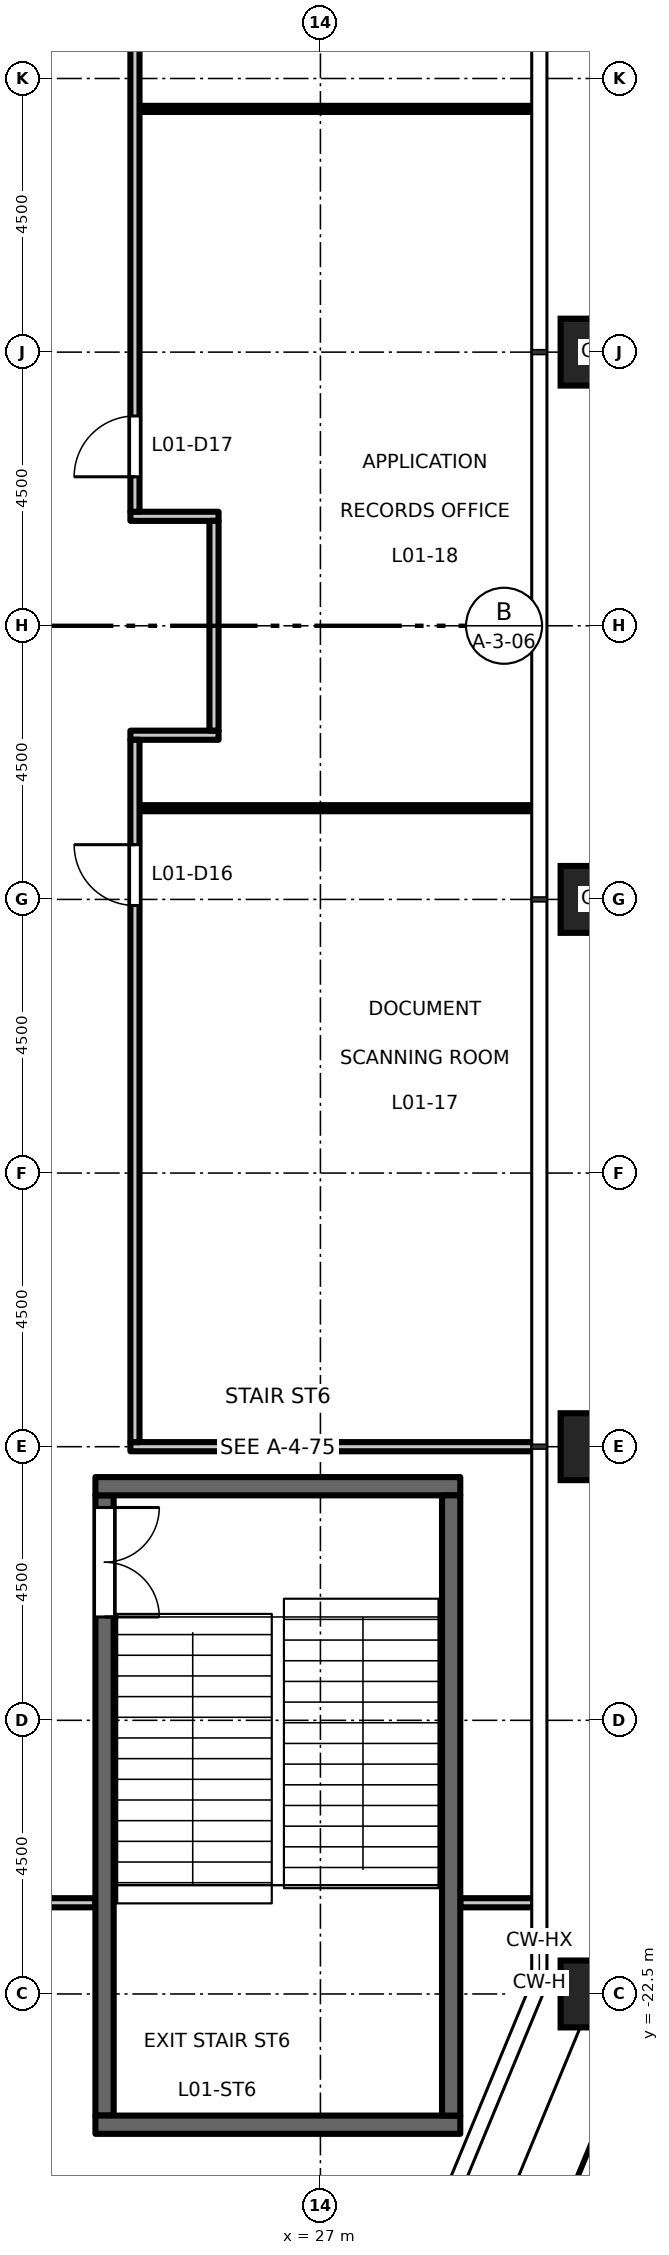
"""IFC4 building model, lengths in metres.
Left out: names, types, materials, properties, quantities, classifications, styles, units other than length and angle.
Written with IfcOpenShell. Run it as: python <this file> out.ifc"""

import sys

from ifc_helpers import new_model, si_unit, direction, frame, frame_2d, origin, origin_2d, place, context, subcontext, project, spatial, rectangle, hollow_rectangle, extrude, element, fill, save


model = new_model("IFC4")
c1 = context("Model", 3, precision=1e-05, world=origin(), true_north=direction((0.0, 1.0)))
c2 = subcontext(c1, "Body", "Model", "MODEL_VIEW")
j1 = project(units=[si_unit("LENGTHUNIT", "METRE"), si_unit("PLANEANGLEUNIT", "RADIAN")], contexts=[c1])
p1 = place(None, origin())
s1 = spatial("IfcSite", under=j1, at=p1, CompositionType="ELEMENT")
p2 = place(p1, origin())
s2 = spatial("IfcBuilding", under=s1, at=p2, CompositionType="ELEMENT")
p3 = place(p2, frame((0.0, 0.0, 7.2)))
s3 = spatial("IfcBuildingStorey", under=s2, at=p3, CompositionType="ELEMENT", Elevation=7.2)
for number, where, z_axis, x_axis in (
    (1, (31.5, -22.5, 0.0), (0.0, 0.0, 1.0), (1.0, 0.0, 0.0)),
    (2, (31.5, -13.5, 0.0), (0.0, 0.0, 1.0), (1.0, 0.0, 0.0)),
    (3, (31.5, -4.5, 0.0), (0.0, 0.0, 1.0), (1.0, 0.0, 0.0)),
    (4, (31.5, 4.5, 0.0), (0.0, 0.0, 1.0), (1.0, 0.0, 0.0)),
):
    element("IfcColumn", number, at=place(p3, frame(where, z_axis=z_axis, x_axis=x_axis)), inside=s3, PredefinedType="COLUMN", context=c2, shape_type="SweptSolid", body=[
        extrude(hollow_rectangle(XDim=1.1, YDim=1.1, WallThickness=0.07, at=origin_2d()), origin(), (0.0, 0.0, 1.0), 5.0),
    ])
p4 = place(p3, frame((23.45, -14.3, 0.0), z_axis=(0.0, 0.0, 1.0), x_axis=(0.0, -1.0, 0.0)))
e5 = element("IfcWall", 5, at=p4, inside=s3, PredefinedType="SHEAR", context=c2, shape_type="SweptSolid", body=[
    extrude(rectangle(XDim=10.2, YDim=0.3, at=frame_2d((5.1, 0.0))), origin(), (0.0, 0.0, 1.0), 4.8),
])
p5 = place(p4, frame((0.2, 0.0, 0.0)))
e6 = element("IfcOpeningElement", 6, at=p5, cuts=e5, PredefinedType="OPENING", context=c2, shape_type="SweptSolid", body=[
    extrude(rectangle(XDim=1.8, YDim=2.1, at=frame_2d((0.9, 1.05))), frame((0.0, 0.16, 0.0), z_axis=(0.0, -1.0, 0.0), x_axis=(1.0, 0.0, 0.0)), (0.0, 0.0, 1.0), 0.32),
])
for number, where, z_axis, x_axis in (
    (7, (29.3, -24.65, 0.0), (0.0, 0.0, 1.0), (-1.0, 0.0, 0.0)),
    (8, (29.3, -14.15, 0.0), (0.0, 0.0, 1.0), (-1.0, 0.0, 0.0)),
):
    element("IfcWall", number, at=place(p3, frame(where, z_axis=z_axis, x_axis=x_axis)), inside=s3, PredefinedType="SHEAR", context=c2, shape_type="SweptSolid", body=[
        extrude(rectangle(XDim=6.0, YDim=0.3, at=frame_2d((3.0, 0.0))), origin(), (0.0, 0.0, 1.0), 4.8),
    ])
p6 = place(p3, frame((29.15, -14.3, 0.0), z_axis=(0.0, 0.0, 1.0), x_axis=(0.0, -1.0, 0.0)))
e9 = element("IfcWall", 9, at=p6, inside=s3, PredefinedType="SHEAR", context=c2, shape_type="SweptSolid", body=[
    extrude(rectangle(XDim=10.2, YDim=0.3, at=frame_2d((5.1, 0.0))), origin(), (0.0, 0.0, 1.0), 4.8),
])
p7 = place(p3, frame((-4.575, -21.0, 0.0), z_axis=(0.0, 0.0, 1.0), x_axis=(1.0, 0.0, 0.0)))
e10 = element("IfcWall", 10, at=p7, inside=s3, PredefinedType="PARTITIONING", context=c2, shape_type="SweptSolid", body=[
    extrude(rectangle(XDim=27.875, YDim=0.15, at=frame_2d((13.938, 0.0))), origin(), (0.0, 0.0, 1.0), 4.8),
])
p8 = place(p7, frame((5.225, 0.0, 0.0)))
e11 = element("IfcOpeningElement", 11, at=p8, cuts=e10, PredefinedType="OPENING", context=c2, shape_type="SweptSolid", body=[
    extrude(rectangle(XDim=1.0, YDim=2.1, at=frame_2d((0.5, 1.05))), frame((0.0, 0.085, 0.0), z_axis=(0.0, -1.0, 0.0), x_axis=(1.0, 0.0, 0.0)), (0.0, 0.0, 1.0), 0.17),
])
p9 = place(p7, frame((16.475, 0.0, 0.0)))
e12 = element("IfcOpeningElement", 12, at=p9, cuts=e10, PredefinedType="OPENING", context=c2, shape_type="SweptSolid", body=[
    extrude(rectangle(XDim=1.0, YDim=2.1, at=frame_2d((0.5, 1.05))), frame((0.0, 0.085, 0.0), z_axis=(0.0, -1.0, 0.0), x_axis=(1.0, 0.0, 0.0)), (0.0, 0.0, 1.0), 0.17),
])
p10 = place(p7, frame((18.725, 0.0, 0.0)))
e13 = element("IfcOpeningElement", 13, at=p10, cuts=e10, PredefinedType="OPENING", context=c2, shape_type="SweptSolid", body=[
    extrude(rectangle(XDim=1.0, YDim=2.1, at=frame_2d((0.5, 1.05))), frame((0.0, 0.085, 0.0), z_axis=(0.0, -1.0, 0.0), x_axis=(1.0, 0.0, 0.0)), (0.0, 0.0, 1.0), 0.17),
])
p11 = place(p3, frame((29.3, -21.0, 0.0), z_axis=(0.0, 0.0, 1.0), x_axis=(1.0, 0.0, 0.0)))
e14 = element("IfcWall", 14, at=p11, inside=s3, PredefinedType="PARTITIONING", context=c2, shape_type="SweptSolid", body=[
    extrude(rectangle(XDim=1.21, YDim=0.15, at=frame_2d((0.605, 0.0))), origin(), (0.0, 0.0, 1.0), 4.8),
])
p12 = place(p3, frame((23.875, -13.5, 0.0), z_axis=(0.0, 0.0, 1.0), x_axis=(1.0, 0.0, 0.0)))
e15 = element("IfcWall", 15, at=p12, inside=s3, PredefinedType="PARTITIONING", context=c2, shape_type="SweptSolid", body=[
    extrude(rectangle(XDim=6.635, YDim=0.15, at=frame_2d((3.317, 0.0))), origin(), (0.0, 0.0, 1.0), 3.8),
])
p13 = place(p3, frame((24.025, -3.0, 0.0), z_axis=(0.0, 0.0, 1.0), x_axis=(1.0, 0.0, 0.0)))
e16 = element("IfcWall", 16, at=p13, inside=s3, PredefinedType="PARTITIONING", context=c2, shape_type="SweptSolid", body=[
    extrude(rectangle(XDim=6.485, YDim=0.1, at=frame_2d((3.243, 0.0))), origin(), (0.0, 0.0, 1.0), 4.8),
])
for number, where, z_axis, x_axis in (
    (17, (23.875, -1.8, 0.0), (0.0, 0.0, 1.0), (1.0, 0.0, 0.0)),
    (18, (23.875, 1.8, 0.0), (0.0, 0.0, 1.0), (1.0, 0.0, 0.0)),
):
    element("IfcWall", number, at=place(p3, frame(where, z_axis=z_axis, x_axis=x_axis)), inside=s3, PredefinedType="PARTITIONING", context=c2, shape_type="SweptSolid", body=[
        extrude(rectangle(XDim=1.45, YDim=0.15, at=frame_2d((0.725, 0.0))), origin(), (0.0, 0.0, 1.0), 4.8),
    ])
p14 = place(p3, frame((24.025, 8.5, 0.0), z_axis=(0.0, 0.0, 1.0), x_axis=(1.0, 0.0, 0.0)))
e19 = element("IfcWall", 19, at=p14, inside=s3, PredefinedType="PARTITIONING", context=c2, shape_type="SweptSolid", body=[
    extrude(rectangle(XDim=6.485, YDim=0.1, at=frame_2d((3.243, 0.0))), origin(), (0.0, 0.0, 1.0), 4.8),
])
p15 = place(p3, frame((23.95, -13.425, 0.0), z_axis=(0.0, 0.0, 1.0), x_axis=(0.0, 1.0, 0.0)))
e20 = element("IfcWall", 20, at=p15, inside=s3, PredefinedType="PARTITIONING", context=c2, shape_type="SweptSolid", body=[
    extrude(rectangle(XDim=11.55, YDim=0.15, at=frame_2d((5.775, 0.0))), origin(), (0.0, 0.0, 1.0), 4.8),
])
p16 = place(p15, frame((8.825, 0.0, 0.0)))
e21 = element("IfcOpeningElement", 21, at=p16, cuts=e20, PredefinedType="OPENING", context=c2, shape_type="SweptSolid", body=[
    extrude(rectangle(XDim=1.0, YDim=2.1, at=frame_2d((0.5, 1.05))), frame((0.0, 0.085, 0.0), z_axis=(0.0, -1.0, 0.0), x_axis=(1.0, 0.0, 0.0)), (0.0, 0.0, 1.0), 0.17),
])
p17 = place(p3, frame((23.95, 1.875, 0.0), z_axis=(0.0, 0.0, 1.0), x_axis=(0.0, 1.0, 0.0)))
e22 = element("IfcWall", 22, at=p17, inside=s3, PredefinedType="PARTITIONING", context=c2, shape_type="SweptSolid", body=[
    extrude(rectangle(XDim=19.05, YDim=0.15, at=frame_2d((9.525, 0.0))), origin(), (0.0, 0.0, 1.0), 4.8),
])
p18 = place(p17, frame((0.575, 0.0, 0.0)))
e23 = element("IfcOpeningElement", 23, at=p18, cuts=e22, PredefinedType="OPENING", context=c2, shape_type="SweptSolid", body=[
    extrude(rectangle(XDim=1.0, YDim=2.1, at=frame_2d((0.5, 1.05))), frame((0.0, 0.085, 0.0), z_axis=(0.0, -1.0, 0.0), x_axis=(1.0, 0.0, 0.0)), (0.0, 0.0, 1.0), 0.17),
])
p19 = place(p17, frame((17.525, 0.0, 0.0)))
e24 = element("IfcOpeningElement", 24, at=p19, cuts=e22, PredefinedType="OPENING", context=c2, shape_type="SweptSolid", body=[
    extrude(rectangle(XDim=1.0, YDim=2.1, at=frame_2d((0.5, 1.05))), frame((0.0, 0.085, 0.0), z_axis=(0.0, -1.0, 0.0), x_axis=(1.0, 0.0, 0.0)), (0.0, 0.0, 1.0), 0.17),
])
p20 = place(p3, frame((25.25, -1.725, 0.0), z_axis=(0.0, 0.0, 1.0), x_axis=(0.0, 1.0, 0.0)))
e25 = element("IfcWall", 25, at=p20, inside=s3, PredefinedType="PARTITIONING", context=c2, shape_type="SweptSolid", body=[
    extrude(rectangle(XDim=3.45, YDim=0.15, at=frame_2d((1.725, 0.0))), origin(), (0.0, 0.0, 1.0), 4.8),
])
p21 = place(p5, origin())
e26 = element("IfcDoor", 26, at=p21, inside=s3, OperationType="DOUBLE_DOOR_SINGLE_SWING", PredefinedType="DOOR", context=c2, shape_type="SweptSolid", body=[
    extrude(rectangle(XDim=1.8, YDim=2.1, at=frame_2d((0.9, 1.05))), frame((0.0, 0.025, 0.0), z_axis=(0.0, -1.0, 0.0), x_axis=(1.0, 0.0, 0.0)), (0.0, 0.0, 1.0), 0.05),
])
fill(e6, e26)
p22 = place(p16, origin())
e27 = element("IfcDoor", 27, at=p22, inside=s3, OperationType="SINGLE_SWING_RIGHT", PredefinedType="DOOR", context=c2, shape_type="SweptSolid", body=[
    extrude(rectangle(XDim=1.0, YDim=2.1, at=frame_2d((0.5, 1.05))), frame((0.0, 0.025, 0.0), z_axis=(0.0, -1.0, 0.0), x_axis=(1.0, 0.0, 0.0)), (0.0, 0.0, 1.0), 0.05),
])
fill(e21, e27)
p23 = place(p18, origin())
e28 = element("IfcDoor", 28, at=p23, inside=s3, OperationType="SINGLE_SWING_LEFT", PredefinedType="DOOR", context=c2, shape_type="SweptSolid", body=[
    extrude(rectangle(XDim=1.0, YDim=2.1, at=frame_2d((0.5, 1.05))), frame((0.0, 0.025, 0.0), z_axis=(0.0, -1.0, 0.0), x_axis=(1.0, 0.0, 0.0)), (0.0, 0.0, 1.0), 0.05),
])
fill(e23, e28)
save(model, sys.argv[1])
